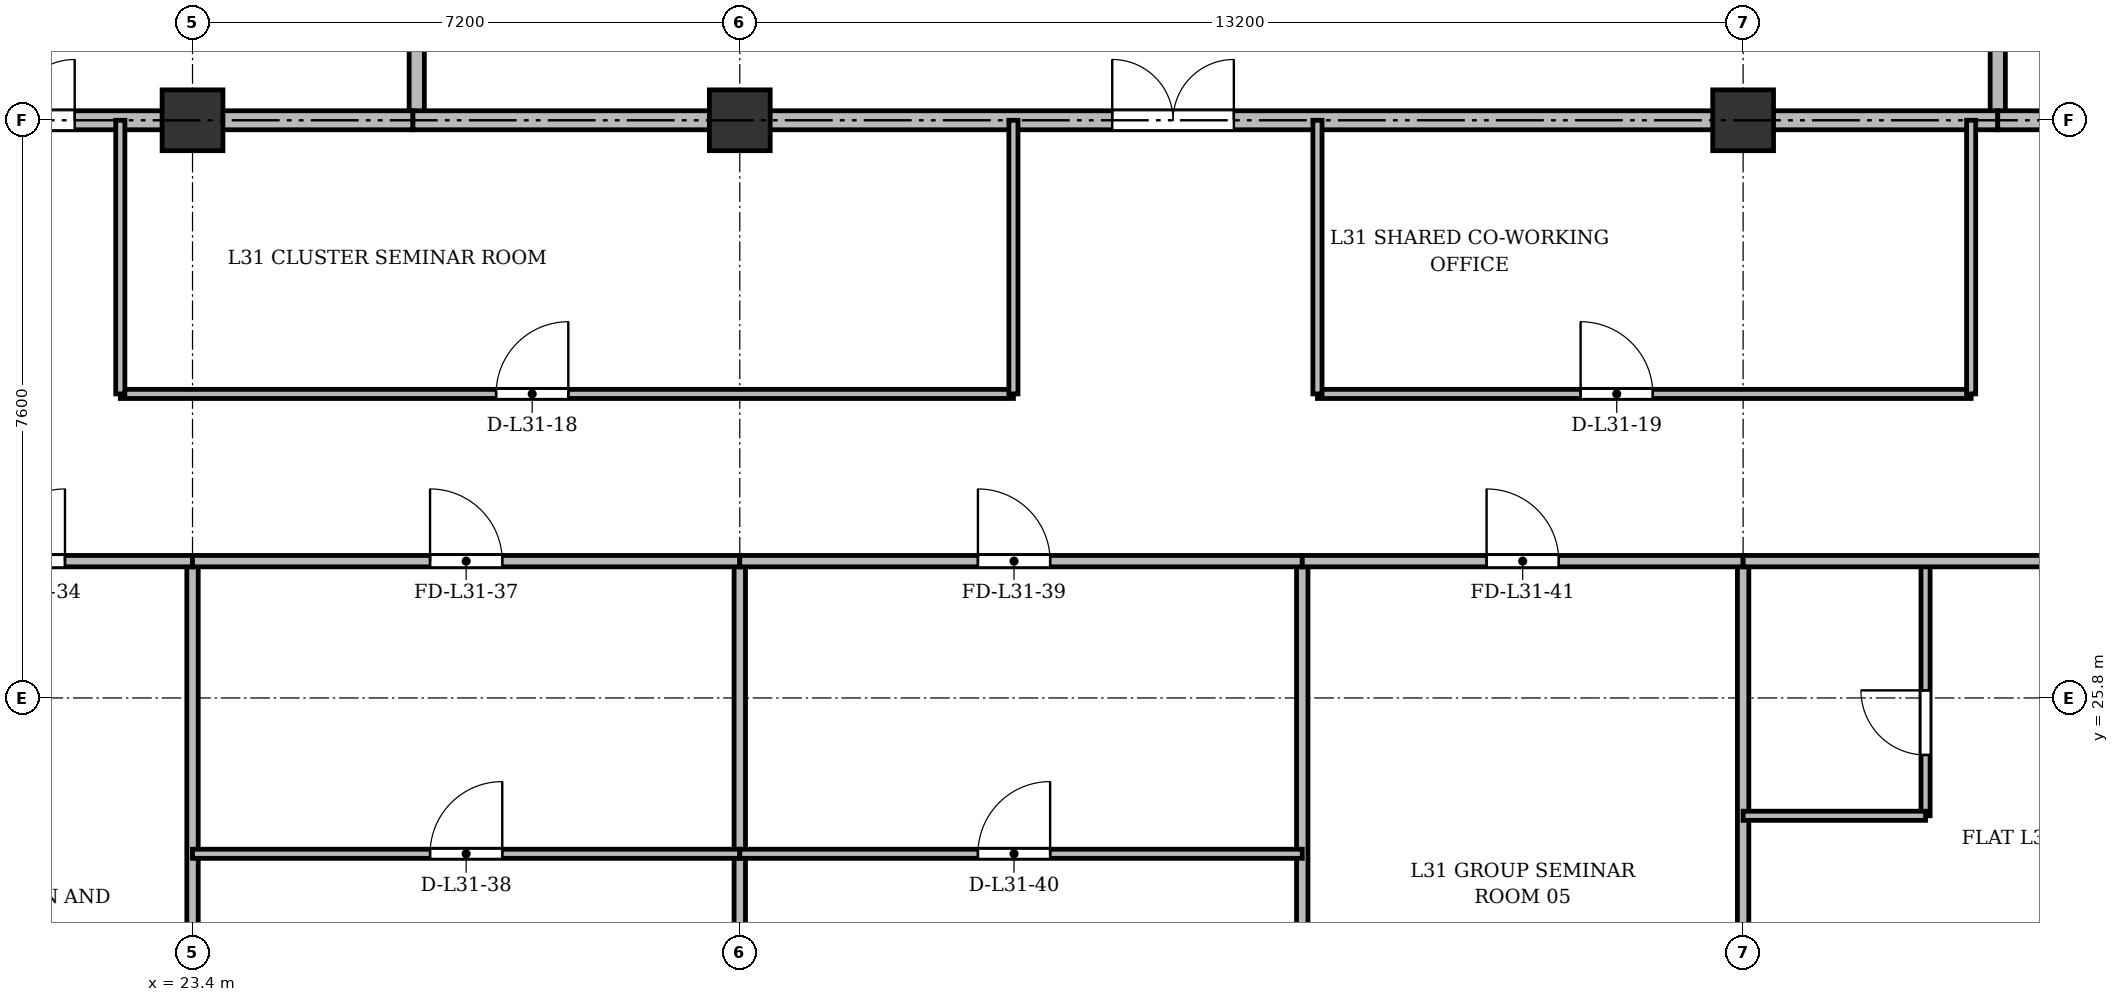
"""IFC4 building model, lengths in metres.
Left out: names, types, materials, properties, quantities, classifications, styles, units other than length and angle.
Written with IfcOpenShell. Run it as: python <this file> out.ifc"""

import sys

from ifc_helpers import new_model, si_unit, direction, frame, frame_2d, origin, origin_2d, place, context, subcontext, project, spatial, rectangle, extrude, source, transform, mapped, element, fill, save


model = new_model("IFC4")
c1 = context("Model", 3, precision=1e-05, world=origin(), true_north=direction((0.0, 1.0)))
c2 = subcontext(c1, "Body", "Model", "MODEL_VIEW")
j1 = project(units=[si_unit("LENGTHUNIT", "METRE"), si_unit("PLANEANGLEUNIT", "RADIAN")], contexts=[c1])
p1 = place(None, origin())
s1 = spatial("IfcSite", under=j1, at=p1, CompositionType="ELEMENT")
p2 = place(p1, origin())
s2 = spatial("IfcBuilding", under=s1, at=p2, CompositionType="ELEMENT")
p3 = place(p2, frame((0.0, 0.0, 121.3)))
s3 = spatial("IfcBuildingStorey", under=s2, at=p3, CompositionType="ELEMENT", Elevation=121.3)
m1 = source(origin(), c2, "Body", "SweptSolid", [
    extrude(rectangle(XDim=0.8, YDim=0.8, at=origin_2d()), origin(), (0.0, 0.0, 1.0), 3.6),
])
for number, where, z_axis, x_axis in (
    (1, (23.4, 33.4, 0.0), (0.0, 0.0, 1.0), (1.0, 0.0, 0.0)),
    (2, (30.6, 33.4, 0.0), (0.0, 0.0, 1.0), (1.0, 0.0, 0.0)),
    (3, (43.8, 33.4, 0.0), (0.0, 0.0, 1.0), (1.0, 0.0, 0.0)),
):
    element("IfcColumn", number, at=place(p3, frame(where, z_axis=z_axis, x_axis=x_axis)), inside=s3, PredefinedType="COLUMN", context=c2, shape_type="MappedRepresentation", body=[
        mapped(m1, transform((0.0, 0.0, 0.0), x_axis=(1.0, 0.0, 0.0), y_axis=(0.0, 1.0, 0.0), z_axis=(0.0, 0.0, 1.0), scale=1.0)),
    ])
p4 = place(p3, frame((26.35, 33.4, 0.0), z_axis=(0.0, 0.0, 1.0), x_axis=(0.0, 1.0, 0.0)))
e4 = element("IfcWall", 4, at=p4, inside=s3, PredefinedType="SOLIDWALL", context=c2, shape_type="SweptSolid", body=[
    extrude(rectangle(XDim=11.3, YDim=0.2, at=frame_2d((5.65, 0.0))), origin(), (0.0, 0.0, 1.0), 2.752),
])
p5 = place(p3, frame((19.5, 33.4, 0.0), z_axis=(0.0, 0.0, 1.0), x_axis=(1.0, 0.0, 0.0)))
e5 = element("IfcWall", 5, at=p5, inside=s3, PredefinedType="PARTITIONING", context=c2, shape_type="SweptSolid", body=[
    extrude(rectangle(XDim=6.8, YDim=0.25, at=frame_2d((3.4, 0.0))), origin(), (0.0, 0.0, 1.0), 2.752),
])
p6 = place(p5, frame((0.75, 0.0, 0.0)))
e6 = element("IfcOpeningElement", 6, at=p6, cuts=e5, PredefinedType="OPENING", context=c2, shape_type="SweptSolid", body=[
    extrude(rectangle(XDim=1.6, YDim=2.2, at=frame_2d((0.8, 1.1))), frame((0.0, 0.135, 0.0), z_axis=(0.0, -1.0, 0.0), x_axis=(1.0, 0.0, 0.0)), (0.0, 0.0, 1.0), 0.27),
])
p7 = place(p3, frame((47.15, 33.4, 0.0), z_axis=(0.0, 0.0, 1.0), x_axis=(0.0, 1.0, 0.0)))
e7 = element("IfcWall", 7, at=p7, inside=s3, PredefinedType="SOLIDWALL", context=c2, shape_type="SweptSolid", body=[
    extrude(rectangle(XDim=11.3, YDim=0.2, at=frame_2d((5.65, 0.0))), origin(), (0.0, 0.0, 1.0), 2.752),
])
p8 = place(p3, frame((26.3, 33.4, 0.0), z_axis=(0.0, 0.0, 1.0), x_axis=(1.0, 0.0, 0.0)))
e8 = element("IfcWall", 8, at=p8, inside=s3, PredefinedType="PARTITIONING", context=c2, shape_type="SweptSolid", body=[
    extrude(rectangle(XDim=20.85, YDim=0.25, at=frame_2d((10.425, 0.0))), origin(), (0.0, 0.0, 1.0), 2.752),
])
p9 = place(p8, frame((9.2, 0.0, 0.0)))
e9 = element("IfcOpeningElement", 9, at=p9, cuts=e8, PredefinedType="OPENING", context=c2, shape_type="SweptSolid", body=[
    extrude(rectangle(XDim=1.6, YDim=2.2, at=frame_2d((0.8, 1.1))), frame((0.0, 0.135, 0.0), z_axis=(0.0, -1.0, 0.0), x_axis=(1.0, 0.0, 0.0)), (0.0, 0.0, 1.0), 0.27),
])
p10 = place(p3, frame((47.15, 33.4, 0.0), z_axis=(0.0, 0.0, 1.0), x_axis=(1.0, 0.0, 0.0)))
e10 = element("IfcWall", 10, at=p10, inside=s3, PredefinedType="PARTITIONING", context=c2, shape_type="SweptSolid", body=[
    extrude(rectangle(XDim=11.15, YDim=0.25, at=frame_2d((5.575, 0.0))), origin(), (0.0, 0.0, 1.0), 2.752),
])
p11 = place(p10, frame((0.7, 0.0, 0.0)))
e11 = element("IfcOpeningElement", 11, at=p11, cuts=e10, PredefinedType="OPENING", context=c2, shape_type="SweptSolid", body=[
    extrude(rectangle(XDim=0.95, YDim=2.15, at=frame_2d((0.475, 1.075))), frame((0.0, 0.135, 0.0), z_axis=(0.0, -1.0, 0.0), x_axis=(1.0, 0.0, 0.0)), (0.0, 0.0, 1.0), 0.27),
])
p12 = place(p10, frame((6.0, 0.0, 0.0)))
e12 = element("IfcOpeningElement", 12, at=p12, cuts=e10, PredefinedType="OPENING", context=c2, shape_type="SweptSolid", body=[
    extrude(rectangle(XDim=1.2, YDim=2.15, at=frame_2d((0.6, 1.075))), frame((0.0, 0.135, 0.0), z_axis=(0.0, -1.0, 0.0), x_axis=(1.0, 0.0, 0.0)), (0.0, 0.0, 1.0), 0.27),
])
p13 = place(p3, frame((22.45, 29.8, 0.0), z_axis=(0.0, 0.0, 1.0), x_axis=(1.0, 0.0, 0.0)))
e13 = element("IfcWall", 13, at=p13, inside=s3, PredefinedType="PARTITIONING", context=c2, shape_type="SweptSolid", body=[
    extrude(rectangle(XDim=11.75, YDim=0.12, at=frame_2d((5.875, 0.0))), origin(), (0.0, 0.0, 1.0), 2.84),
])
p14 = place(p13, frame((4.944, 0.0, 0.0)))
e14 = element("IfcOpeningElement", 14, at=p14, cuts=e13, PredefinedType="OPENING", context=c2, shape_type="SweptSolid", body=[
    extrude(rectangle(XDim=0.95, YDim=2.15, at=frame_2d((0.475, 1.075))), frame((0.0, 0.07, 0.0), z_axis=(0.0, -1.0, 0.0), x_axis=(1.0, 0.0, 0.0)), (0.0, 0.0, 1.0), 0.14),
])
p15 = place(p3, frame((38.2, 29.8, 0.0), z_axis=(0.0, 0.0, 1.0), x_axis=(1.0, 0.0, 0.0)))
e15 = element("IfcWall", 15, at=p15, inside=s3, PredefinedType="PARTITIONING", context=c2, shape_type="SweptSolid", body=[
    extrude(rectangle(XDim=8.6, YDim=0.12, at=frame_2d((4.3, 0.0))), origin(), (0.0, 0.0, 1.0), 2.84),
])
p16 = place(p15, frame((3.462, 0.0, 0.0)))
e16 = element("IfcOpeningElement", 16, at=p16, cuts=e15, PredefinedType="OPENING", context=c2, shape_type="SweptSolid", body=[
    extrude(rectangle(XDim=0.95, YDim=2.15, at=frame_2d((0.475, 1.075))), frame((0.0, 0.07, 0.0), z_axis=(0.0, -1.0, 0.0), x_axis=(1.0, 0.0, 0.0)), (0.0, 0.0, 1.0), 0.14),
])
for number, where, z_axis, x_axis in (
    (17, (22.45, 29.8, 0.0), (0.0, 0.0, 1.0), (0.0, 1.0, 0.0)),
    (18, (34.2, 29.8, 0.0), (0.0, 0.0, 1.0), (0.0, 1.0, 0.0)),
    (19, (38.2, 29.8, 0.0), (0.0, 0.0, 1.0), (0.0, 1.0, 0.0)),
    (20, (46.8, 29.8, 0.0), (0.0, 0.0, 1.0), (0.0, 1.0, 0.0)),
):
    element("IfcWall", number, at=place(p3, frame(where, z_axis=z_axis, x_axis=x_axis)), inside=s3, PredefinedType="PARTITIONING", context=c2, shape_type="SweptSolid", body=[
        extrude(rectangle(XDim=3.6, YDim=0.12, at=frame_2d((1.8, 0.0))), origin(), (0.0, 0.0, 1.0), 2.752),
    ])
for number, where, z_axis, x_axis in (
    (21, (23.4, 3.145, 0.0), (0.0, 0.0, 1.0), (0.0, 1.0, 0.0)),
    (22, (30.6, 3.145, 0.0), (0.0, 0.0, 1.0), (0.0, 1.0, 0.0)),
):
    element("IfcWall", number, at=place(p3, frame(where, z_axis=z_axis, x_axis=x_axis)), inside=s3, PredefinedType="PARTITIONING", context=c2, shape_type="SweptSolid", body=[
        extrude(rectangle(XDim=24.455, YDim=0.15, at=frame_2d((12.228, 0.0))), origin(), (0.0, 0.0, 1.0), 2.84),
    ])
p17 = place(p3, frame((38.0, 3.145, 0.0), z_axis=(0.0, 0.0, 1.0), x_axis=(0.0, 1.0, 0.0)))
e23 = element("IfcWall", 23, at=p17, inside=s3, PredefinedType="PARTITIONING", context=c2, shape_type="SweptSolid", body=[
    extrude(rectangle(XDim=24.455, YDim=0.15, at=frame_2d((12.228, 0.0))), origin(), (0.0, 0.0, 1.0), 2.752),
])
p18 = place(p3, frame((43.8, 3.145, 0.0), z_axis=(0.0, 0.0, 1.0), x_axis=(0.0, 1.0, 0.0)))
e24 = element("IfcWall", 24, at=p18, inside=s3, PredefinedType="PARTITIONING", context=c2, shape_type="SweptSolid", body=[
    extrude(rectangle(XDim=24.455, YDim=0.15, at=frame_2d((12.228, 0.0))), origin(), (0.0, 0.0, 1.0), 2.84),
])
p19 = place(p3, frame((15.6, 27.6, 0.0), z_axis=(0.0, 0.0, 1.0), x_axis=(1.0, 0.0, 0.0)))
e25 = element("IfcWall", 25, at=p19, inside=s3, PredefinedType="PARTITIONING", context=c2, shape_type="SweptSolid", body=[
    extrude(rectangle(XDim=7.8, YDim=0.15, at=frame_2d((3.9, 0.0))), origin(), (0.0, 0.0, 1.0), 2.84),
])
p20 = place(p19, frame((5.172, 0.0, 0.0)))
e26 = element("IfcOpeningElement", 26, at=p20, cuts=e25, PredefinedType="OPENING", context=c2, shape_type="SweptSolid", body=[
    extrude(rectangle(XDim=0.95, YDim=2.15, at=frame_2d((0.475, 1.075))), frame((0.0, 0.085, 0.0), z_axis=(0.0, -1.0, 0.0), x_axis=(1.0, 0.0, 0.0)), (0.0, 0.0, 1.0), 0.17),
])
p21 = place(p3, frame((23.4, 27.6, 0.0), z_axis=(0.0, 0.0, 1.0), x_axis=(1.0, 0.0, 0.0)))
e27 = element("IfcWall", 27, at=p21, inside=s3, PredefinedType="PARTITIONING", context=c2, shape_type="SweptSolid", body=[
    extrude(rectangle(XDim=7.2, YDim=0.15, at=frame_2d((3.6, 0.0))), origin(), (0.0, 0.0, 1.0), 2.84),
])
p22 = place(p21, frame((3.125, 0.0, 0.0)))
e28 = element("IfcOpeningElement", 28, at=p22, cuts=e27, PredefinedType="OPENING", context=c2, shape_type="SweptSolid", body=[
    extrude(rectangle(XDim=0.95, YDim=2.15, at=frame_2d((0.475, 1.075))), frame((0.0, 0.085, 0.0), z_axis=(0.0, -1.0, 0.0), x_axis=(1.0, 0.0, 0.0)), (0.0, 0.0, 1.0), 0.17),
])
p23 = place(p3, frame((23.4, 23.75, 0.0), z_axis=(0.0, 0.0, 1.0), x_axis=(1.0, 0.0, 0.0)))
e29 = element("IfcWall", 29, at=p23, inside=s3, PredefinedType="PARTITIONING", context=c2, shape_type="SweptSolid", body=[
    extrude(rectangle(XDim=7.2, YDim=0.12, at=frame_2d((3.6, 0.0))), origin(), (0.0, 0.0, 1.0), 2.84),
])
p24 = place(p23, frame((3.125, 0.0, 0.0)))
e30 = element("IfcOpeningElement", 30, at=p24, cuts=e29, PredefinedType="OPENING", context=c2, shape_type="SweptSolid", body=[
    extrude(rectangle(XDim=0.95, YDim=2.15, at=frame_2d((0.475, 1.075))), frame((0.0, 0.07, 0.0), z_axis=(0.0, -1.0, 0.0), x_axis=(1.0, 0.0, 0.0)), (0.0, 0.0, 1.0), 0.14),
])
p25 = place(p3, frame((30.6, 27.6, 0.0), z_axis=(0.0, 0.0, 1.0), x_axis=(1.0, 0.0, 0.0)))
e31 = element("IfcWall", 31, at=p25, inside=s3, PredefinedType="PARTITIONING", context=c2, shape_type="SweptSolid", body=[
    extrude(rectangle(XDim=7.4, YDim=0.15, at=frame_2d((3.7, 0.0))), origin(), (0.0, 0.0, 1.0), 2.84),
])
p26 = place(p25, frame((3.133, 0.0, 0.0)))
e32 = element("IfcOpeningElement", 32, at=p26, cuts=e31, PredefinedType="OPENING", context=c2, shape_type="SweptSolid", body=[
    extrude(rectangle(XDim=0.95, YDim=2.15, at=frame_2d((0.475, 1.075))), frame((0.0, 0.085, 0.0), z_axis=(0.0, -1.0, 0.0), x_axis=(1.0, 0.0, 0.0)), (0.0, 0.0, 1.0), 0.17),
])
p27 = place(p3, frame((30.6, 23.75, 0.0), z_axis=(0.0, 0.0, 1.0), x_axis=(1.0, 0.0, 0.0)))
e33 = element("IfcWall", 33, at=p27, inside=s3, PredefinedType="PARTITIONING", context=c2, shape_type="SweptSolid", body=[
    extrude(rectangle(XDim=7.4, YDim=0.12, at=frame_2d((3.7, 0.0))), origin(), (0.0, 0.0, 1.0), 2.84),
])
p28 = place(p27, frame((3.133, 0.0, 0.0)))
e34 = element("IfcOpeningElement", 34, at=p28, cuts=e33, PredefinedType="OPENING", context=c2, shape_type="SweptSolid", body=[
    extrude(rectangle(XDim=0.95, YDim=2.15, at=frame_2d((0.475, 1.075))), frame((0.0, 0.07, 0.0), z_axis=(0.0, -1.0, 0.0), x_axis=(1.0, 0.0, 0.0)), (0.0, 0.0, 1.0), 0.14),
])
p29 = place(p3, frame((38.0, 27.6, 0.0), z_axis=(0.0, 0.0, 1.0), x_axis=(1.0, 0.0, 0.0)))
e35 = element("IfcWall", 35, at=p29, inside=s3, PredefinedType="PARTITIONING", context=c2, shape_type="SweptSolid", body=[
    extrude(rectangle(XDim=5.8, YDim=0.15, at=frame_2d((2.9, 0.0))), origin(), (0.0, 0.0, 1.0), 2.84),
])
p30 = place(p29, frame((2.425, 0.0, 0.0)))
e36 = element("IfcOpeningElement", 36, at=p30, cuts=e35, PredefinedType="OPENING", context=c2, shape_type="SweptSolid", body=[
    extrude(rectangle(XDim=0.95, YDim=2.15, at=frame_2d((0.475, 1.075))), frame((0.0, 0.085, 0.0), z_axis=(0.0, -1.0, 0.0), x_axis=(1.0, 0.0, 0.0)), (0.0, 0.0, 1.0), 0.17),
])
p31 = place(p3, frame((46.2, 24.25, 0.0), z_axis=(0.0, 0.0, 1.0), x_axis=(0.0, 1.0, 0.0)))
e37 = element("IfcWall", 37, at=p31, inside=s3, PredefinedType="PARTITIONING", context=c2, shape_type="SweptSolid", body=[
    extrude(rectangle(XDim=3.35, YDim=0.12, at=frame_2d((1.675, 0.0))), origin(), (0.0, 0.0, 1.0), 2.99),
])
p32 = place(p31, frame((0.8, 0.0, 0.0)))
e38 = element("IfcOpeningElement", 38, at=p32, cuts=e37, PredefinedType="OPENING", context=c2, shape_type="SweptSolid", body=[
    extrude(rectangle(XDim=0.85, YDim=2.1, at=frame_2d((0.425, 1.05))), frame((0.0, 0.07, 0.0), z_axis=(0.0, -1.0, 0.0), x_axis=(1.0, 0.0, 0.0)), (0.0, 0.0, 1.0), 0.14),
])
p33 = place(p3, frame((43.8, 24.25, 0.0), z_axis=(0.0, 0.0, 1.0), x_axis=(1.0, 0.0, 0.0)))
e39 = element("IfcWall", 39, at=p33, inside=s3, PredefinedType="PARTITIONING", context=c2, shape_type="SweptSolid", body=[
    extrude(rectangle(XDim=2.4, YDim=0.12, at=frame_2d((1.2, 0.0))), origin(), (0.0, 0.0, 1.0), 2.84),
])
p34 = place(p3, frame((43.8, 27.6, 0.0), z_axis=(0.0, 0.0, 1.0), x_axis=(1.0, 0.0, 0.0)))
e40 = element("IfcWall", 40, at=p34, inside=s3, PredefinedType="PARTITIONING", context=c2, shape_type="SweptSolid", body=[
    extrude(rectangle(XDim=7.2, YDim=0.15, at=frame_2d((3.6, 0.0))), origin(), (0.0, 0.0, 1.0), 2.84),
])
p35 = place(p34, frame((4.706, 0.0, 0.0)))
e41 = element("IfcOpeningElement", 41, at=p35, cuts=e40, PredefinedType="OPENING", context=c2, shape_type="SweptSolid", body=[
    extrude(rectangle(XDim=0.95, YDim=2.15, at=frame_2d((0.475, 1.075))), frame((0.0, 0.085, 0.0), z_axis=(0.0, -1.0, 0.0), x_axis=(1.0, 0.0, 0.0)), (0.0, 0.0, 1.0), 0.17),
])
m2 = source(origin(), c2, "Body", "SweptSolid", [
    extrude(rectangle(XDim=1.6, YDim=2.2, at=frame_2d((0.8, 1.1))), frame((0.0, 0.025, 0.0), z_axis=(0.0, -1.0, 0.0), x_axis=(1.0, 0.0, 0.0)), (0.0, 0.0, 1.0), 0.05),
])
p36 = place(p6, origin())
e42 = element("IfcDoor", 42, at=p36, inside=s3, OperationType="DOUBLE_DOOR_SINGLE_SWING", PredefinedType="DOOR", context=c2, shape_type="MappedRepresentation", body=[
    mapped(m2, transform((0.0, 0.0, 0.0), x_axis=(1.0, 0.0, 0.0), y_axis=(0.0, 1.0, 0.0), z_axis=(0.0, 0.0, 1.0), scale=1.0)),
])
fill(e6, e42)
p37 = place(p9, origin())
e43 = element("IfcDoor", 43, at=p37, inside=s3, OperationType="DOUBLE_DOOR_SINGLE_SWING", PredefinedType="DOOR", context=c2, shape_type="MappedRepresentation", body=[
    mapped(m2, transform((0.0, 0.0, 0.0), x_axis=(1.0, 0.0, 0.0), y_axis=(0.0, 1.0, 0.0), z_axis=(0.0, 0.0, 1.0), scale=1.0)),
])
fill(e9, e43)
m3 = source(origin(), c2, "Body", "SweptSolid", [
    extrude(rectangle(XDim=0.95, YDim=2.15, at=frame_2d((0.475, 1.075))), frame((0.0, 0.025, 0.0), z_axis=(0.0, -1.0, 0.0), x_axis=(1.0, 0.0, 0.0)), (0.0, 0.0, 1.0), 0.05),
])
p38 = place(p14, origin())
e44 = element("IfcDoor", 44, at=p38, inside=s3, OperationType="SINGLE_SWING_RIGHT", PredefinedType="DOOR", context=c2, shape_type="MappedRepresentation", body=[
    mapped(m3, transform((0.0, 0.0, 0.0), x_axis=(1.0, 0.0, 0.0), y_axis=(0.0, 1.0, 0.0), z_axis=(0.0, 0.0, 1.0), scale=1.0)),
])
fill(e14, e44)
p39 = place(p16, origin())
e45 = element("IfcDoor", 45, at=p39, inside=s3, OperationType="SINGLE_SWING_LEFT", PredefinedType="DOOR", context=c2, shape_type="MappedRepresentation", body=[
    mapped(m3, transform((0.0, 0.0, 0.0), x_axis=(1.0, 0.0, 0.0), y_axis=(0.0, 1.0, 0.0), z_axis=(0.0, 0.0, 1.0), scale=1.0)),
])
fill(e16, e45)
p40 = place(p20, origin())
e46 = element("IfcDoor", 46, at=p40, inside=s3, OperationType="SINGLE_SWING_RIGHT", PredefinedType="DOOR", context=c2, shape_type="MappedRepresentation", body=[
    mapped(m3, transform((0.0, 0.0, 0.0), x_axis=(1.0, 0.0, 0.0), y_axis=(0.0, 1.0, 0.0), z_axis=(0.0, 0.0, 1.0), scale=1.0)),
])
fill(e26, e46)
p41 = place(p22, origin())
e47 = element("IfcDoor", 47, at=p41, inside=s3, OperationType="SINGLE_SWING_LEFT", PredefinedType="DOOR", context=c2, shape_type="MappedRepresentation", body=[
    mapped(m3, transform((0.0, 0.0, 0.0), x_axis=(1.0, 0.0, 0.0), y_axis=(0.0, 1.0, 0.0), z_axis=(0.0, 0.0, 1.0), scale=1.0)),
])
fill(e28, e47)
p42 = place(p24, origin())
e48 = element("IfcDoor", 48, at=p42, inside=s3, OperationType="SINGLE_SWING_RIGHT", PredefinedType="DOOR", context=c2, shape_type="MappedRepresentation", body=[
    mapped(m3, transform((0.0, 0.0, 0.0), x_axis=(1.0, 0.0, 0.0), y_axis=(0.0, 1.0, 0.0), z_axis=(0.0, 0.0, 1.0), scale=1.0)),
])
fill(e30, e48)
p43 = place(p26, origin())
e49 = element("IfcDoor", 49, at=p43, inside=s3, OperationType="SINGLE_SWING_LEFT", PredefinedType="DOOR", context=c2, shape_type="MappedRepresentation", body=[
    mapped(m3, transform((0.0, 0.0, 0.0), x_axis=(1.0, 0.0, 0.0), y_axis=(0.0, 1.0, 0.0), z_axis=(0.0, 0.0, 1.0), scale=1.0)),
])
fill(e32, e49)
p44 = place(p28, origin())
e50 = element("IfcDoor", 50, at=p44, inside=s3, OperationType="SINGLE_SWING_RIGHT", PredefinedType="DOOR", context=c2, shape_type="MappedRepresentation", body=[
    mapped(m3, transform((0.0, 0.0, 0.0), x_axis=(1.0, 0.0, 0.0), y_axis=(0.0, 1.0, 0.0), z_axis=(0.0, 0.0, 1.0), scale=1.0)),
])
fill(e34, e50)
p45 = place(p30, origin())
e51 = element("IfcDoor", 51, at=p45, inside=s3, OperationType="SINGLE_SWING_LEFT", PredefinedType="DOOR", context=c2, shape_type="MappedRepresentation", body=[
    mapped(m3, transform((0.0, 0.0, 0.0), x_axis=(1.0, 0.0, 0.0), y_axis=(0.0, 1.0, 0.0), z_axis=(0.0, 0.0, 1.0), scale=1.0)),
])
fill(e36, e51)
m4 = source(origin(), c2, "Body", "SweptSolid", [
    extrude(rectangle(XDim=0.85, YDim=2.1, at=frame_2d((0.425, 1.05))), frame((0.0, 0.025, 0.0), z_axis=(0.0, -1.0, 0.0), x_axis=(1.0, 0.0, 0.0)), (0.0, 0.0, 1.0), 0.05),
])
p46 = place(p32, origin())
e52 = element("IfcDoor", 52, at=p46, inside=s3, OperationType="SINGLE_SWING_RIGHT", PredefinedType="DOOR", context=c2, shape_type="MappedRepresentation", body=[
    mapped(m4, transform((0.0, 0.0, 0.0), x_axis=(1.0, 0.0, 0.0), y_axis=(0.0, 1.0, 0.0), z_axis=(0.0, 0.0, 1.0), scale=1.0)),
])
fill(e38, e52)
save(model, sys.argv[1])
